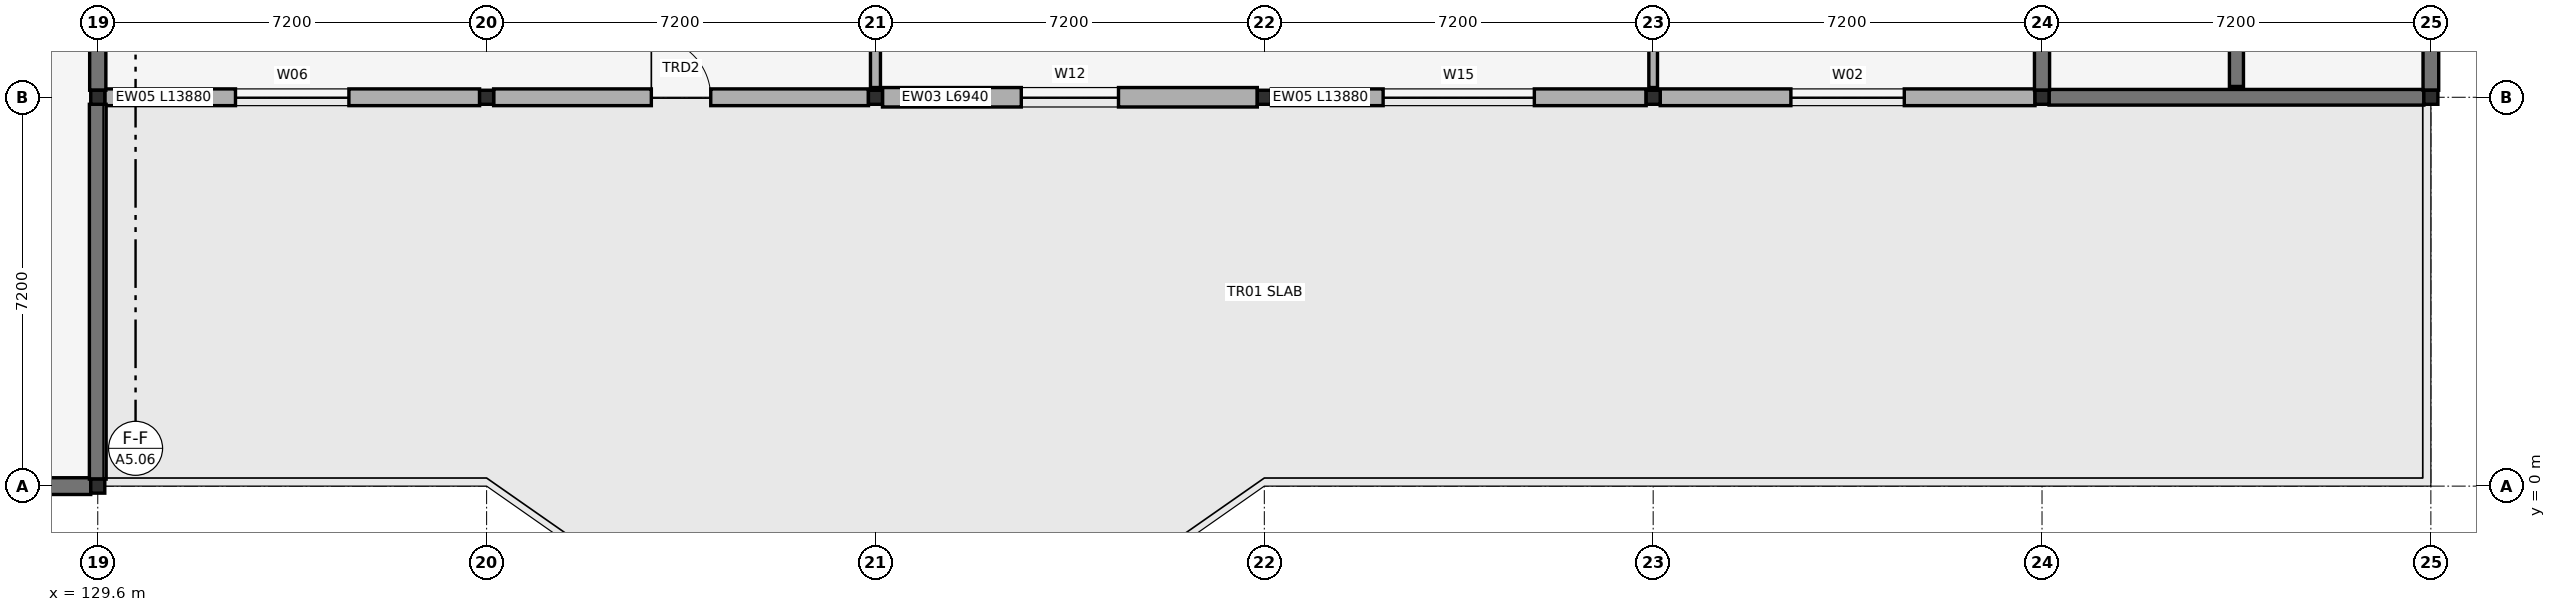
"""IFC4 building model, lengths in metres.
Left out: names, types, materials, properties, quantities, classifications, styles, units other than length and angle.
Written with IfcOpenShell. Run it as: python <this file> out.ifc"""

import sys

from ifc_helpers import new_model, si_unit, direction, frame, frame_2d, origin, origin_2d, place, context, subcontext, project, spatial, rectangle, hollow_rectangle, extrude, element, fill, save


model = new_model("IFC4")
c1 = context("Model", 3, precision=1e-05, world=origin(), true_north=direction((0.0, 1.0)))
c2 = subcontext(c1, "Body", "Model", "MODEL_VIEW")
j1 = project(units=[si_unit("LENGTHUNIT", "METRE"), si_unit("PLANEANGLEUNIT", "RADIAN")], contexts=[c1])
p1 = place(None, origin())
s1 = spatial("IfcSite", under=j1, at=p1, CompositionType="ELEMENT")
p2 = place(p1, origin())
s2 = spatial("IfcBuilding", under=s1, at=p2, CompositionType="ELEMENT")
p3 = place(p2, frame((0.0, 0.0, 23.4)))
s3 = spatial("IfcBuildingStorey", under=s2, at=p3, CompositionType="ELEMENT", Elevation=23.4)
for number, where, z_axis, x_axis in (
    (1, (129.6, 0.0, 0.0), (0.0, 0.0, 1.0), (1.0, 0.0, 0.0)),
    (2, (129.6, 7.2, 0.0), (0.0, 0.0, 1.0), (1.0, 0.0, 0.0)),
    (3, (136.8, 7.2, 0.0), (0.0, 0.0, 1.0), (1.0, 0.0, 0.0)),
    (4, (144.0, 7.2, 0.0), (0.0, 0.0, 1.0), (1.0, 0.0, 0.0)),
    (5, (151.2, 7.2, 0.0), (0.0, 0.0, 1.0), (1.0, 0.0, 0.0)),
    (6, (158.4, 7.2, 0.0), (0.0, 0.0, 1.0), (1.0, 0.0, 0.0)),
    (7, (165.6, 7.2, 0.0), (0.0, 0.0, 1.0), (1.0, 0.0, 0.0)),
    (8, (172.8, 7.2, 0.0), (0.0, 0.0, 1.0), (1.0, 0.0, 0.0)),
):
    element("IfcColumn", number, at=place(p3, frame(where, z_axis=z_axis, x_axis=x_axis)), inside=s3, PredefinedType="COLUMN", context=c2, shape_type="SweptSolid", body=[
        extrude(hollow_rectangle(XDim=0.26, YDim=0.26, WallThickness=0.012, at=origin_2d()), origin(), (0.0, 0.0, 1.0), 4.2),
    ])
p4 = place(p3, frame((129.73, 7.2, 0.0), z_axis=(0.0, 0.0, 1.0), x_axis=(1.0, 0.0, 0.0)))
e9 = element("IfcWall", 9, at=p4, inside=s3, PredefinedType="SOLIDWALL", context=c2, shape_type="SweptSolid", body=[
    extrude(rectangle(XDim=6.94, YDim=0.31, at=frame_2d((3.47, 0.0))), origin(), (0.0, 0.0, 1.0), 3.505),
])
p5 = place(p4, frame((2.42, 0.0, 0.95)))
e10 = element("IfcOpeningElement", 10, at=p5, cuts=e9, PredefinedType="OPENING", context=c2, shape_type="SweptSolid", body=[
    extrude(rectangle(XDim=2.1, YDim=2.0, at=frame_2d((1.05, 1.0))), frame((0.0, 0.17, 0.0), z_axis=(0.0, -1.0, 0.0), x_axis=(1.0, 0.0, 0.0)), (0.0, 0.0, 1.0), 0.34),
])
p6 = place(p3, frame((136.93, 7.2, 0.0), z_axis=(0.0, 0.0, 1.0), x_axis=(1.0, 0.0, 0.0)))
e11 = element("IfcWall", 11, at=p6, inside=s3, PredefinedType="SOLIDWALL", context=c2, shape_type="SweptSolid", body=[
    extrude(rectangle(XDim=6.94, YDim=0.31, at=frame_2d((3.47, 0.0))), origin(), (0.0, 0.0, 1.0), 3.98),
])
p7 = place(p6, frame((2.92, 0.0, 0.0)))
e12 = element("IfcOpeningElement", 12, at=p7, cuts=e11, PredefinedType="OPENING", context=c2, shape_type="SweptSolid", body=[
    extrude(rectangle(XDim=1.1, YDim=2.2, at=frame_2d((0.55, 1.1))), frame((0.0, 0.17, 0.0), z_axis=(0.0, -1.0, 0.0), x_axis=(1.0, 0.0, 0.0)), (0.0, 0.0, 1.0), 0.34),
])
p8 = place(p3, frame((144.13, 7.2, 0.0), z_axis=(0.0, 0.0, 1.0), x_axis=(1.0, 0.0, 0.0)))
e13 = element("IfcWall", 13, at=p8, inside=s3, PredefinedType="SOLIDWALL", context=c2, shape_type="SweptSolid", body=[
    extrude(rectangle(XDim=6.94, YDim=0.36, at=frame_2d((3.47, 0.0))), origin(), (0.0, 0.0, 1.0), 3.98),
])
p9 = place(p8, frame((2.57, 0.0, 0.95)))
e14 = element("IfcOpeningElement", 14, at=p9, cuts=e13, PredefinedType="OPENING", context=c2, shape_type="SweptSolid", body=[
    extrude(rectangle(XDim=1.8, YDim=1.75, at=frame_2d((0.9, 0.875))), frame((0.0, 0.195, 0.0), z_axis=(0.0, -1.0, 0.0), x_axis=(1.0, 0.0, 0.0)), (0.0, 0.0, 1.0), 0.39),
])
p10 = place(p3, frame((151.33, 7.2, 0.0), z_axis=(0.0, 0.0, 1.0), x_axis=(1.0, 0.0, 0.0)))
e15 = element("IfcWall", 15, at=p10, inside=s3, PredefinedType="SOLIDWALL", context=c2, shape_type="SweptSolid", body=[
    extrude(rectangle(XDim=6.94, YDim=0.31, at=frame_2d((3.47, 0.0))), origin(), (0.0, 0.0, 1.0), 3.98),
])
p11 = place(p10, frame((2.07, 0.0, 0.95)))
e16 = element("IfcOpeningElement", 16, at=p11, cuts=e15, PredefinedType="OPENING", context=c2, shape_type="SweptSolid", body=[
    extrude(rectangle(XDim=2.8, YDim=1.5, at=frame_2d((1.4, 0.75))), frame((0.0, 0.17, 0.0), z_axis=(0.0, -1.0, 0.0), x_axis=(1.0, 0.0, 0.0)), (0.0, 0.0, 1.0), 0.34),
])
p12 = place(p3, frame((158.53, 7.2, 0.0), z_axis=(0.0, 0.0, 1.0), x_axis=(1.0, 0.0, 0.0)))
e17 = element("IfcWall", 17, at=p12, inside=s3, PredefinedType="SOLIDWALL", context=c2, shape_type="SweptSolid", body=[
    extrude(rectangle(XDim=6.94, YDim=0.31, at=frame_2d((3.47, 0.0))), origin(), (0.0, 0.0, 1.0), 3.98),
])
p13 = place(p12, frame((2.42, 0.0, 0.95)))
e18 = element("IfcOpeningElement", 18, at=p13, cuts=e17, PredefinedType="OPENING", context=c2, shape_type="SweptSolid", body=[
    extrude(rectangle(XDim=2.1, YDim=2.65, at=frame_2d((1.05, 1.325))), frame((0.0, 0.17, 0.0), z_axis=(0.0, -1.0, 0.0), x_axis=(1.0, 0.0, 0.0)), (0.0, 0.0, 1.0), 0.34),
])
p14 = place(p3, frame((122.53, 0.0, 0.0), z_axis=(0.0, 0.0, 1.0), x_axis=(1.0, 0.0, 0.0)))
e19 = element("IfcWall", 19, at=p14, inside=s3, PredefinedType="SHEAR", context=c2, shape_type="SweptSolid", body=[
    extrude(rectangle(XDim=6.94, YDim=0.31, at=frame_2d((3.47, 0.0))), origin(), (0.0, 0.0, 1.0), 4.0),
])
p15 = place(p3, frame((129.6, 0.13, 0.0), z_axis=(0.0, 0.0, 1.0), x_axis=(0.0, 1.0, 0.0)))
e20 = element("IfcWall", 20, at=p15, inside=s3, PredefinedType="SHEAR", context=c2, shape_type="SweptSolid", body=[
    extrude(rectangle(XDim=6.94, YDim=0.31, at=frame_2d((3.47, 0.0))), origin(), (0.0, 0.0, 1.0), 4.0),
])
p16 = place(p3, frame((129.6, 7.33, 0.0), z_axis=(0.0, 0.0, 1.0), x_axis=(0.0, 1.0, 0.0)))
e21 = element("IfcWall", 21, at=p16, inside=s3, PredefinedType="SHEAR", context=c2, shape_type="SweptSolid", body=[
    extrude(rectangle(XDim=6.94, YDim=0.3, at=frame_2d((3.47, 0.0))), origin(), (0.0, 0.0, 1.0), 4.0),
])
p17 = place(p16, frame((2.67, 0.0, 0.0)))
e22 = element("IfcOpeningElement", 22, at=p17, cuts=e21, PredefinedType="OPENING", context=c2, shape_type="SweptSolid", body=[
    extrude(rectangle(XDim=1.6, YDim=2.2, at=frame_2d((0.8, 1.1))), frame((0.0, 0.165, 0.0), z_axis=(0.0, -1.0, 0.0), x_axis=(1.0, 0.0, 0.0)), (0.0, 0.0, 1.0), 0.33),
])
p18 = place(p3, frame((165.73, 7.2, 0.0), z_axis=(0.0, 0.0, 1.0), x_axis=(1.0, 0.0, 0.0)))
e23 = element("IfcWall", 23, at=p18, inside=s3, PredefinedType="SHEAR", context=c2, shape_type="SweptSolid", body=[
    extrude(rectangle(XDim=6.94, YDim=0.29, at=frame_2d((3.47, 0.0))), origin(), (0.0, 0.0, 1.0), 4.0),
])
p19 = place(p3, frame((165.6, 7.33, 0.0), z_axis=(0.0, 0.0, 1.0), x_axis=(0.0, 1.0, 0.0)))
e24 = element("IfcWall", 24, at=p19, inside=s3, PredefinedType="SHEAR", context=c2, shape_type="SweptSolid", body=[
    extrude(rectangle(XDim=6.94, YDim=0.28, at=frame_2d((3.47, 0.0))), origin(), (0.0, 0.0, 1.0), 4.0),
])
p20 = place(p3, frame((172.8, 7.33, 0.0), z_axis=(0.0, 0.0, 1.0), x_axis=(0.0, 1.0, 0.0)))
e25 = element("IfcWall", 25, at=p20, inside=s3, PredefinedType="SHEAR", context=c2, shape_type="SweptSolid", body=[
    extrude(rectangle(XDim=6.94, YDim=0.29, at=frame_2d((3.47, 0.0))), origin(), (0.0, 0.0, 1.0), 4.0),
])
p21 = place(p3, frame((169.2, 7.4, 0.0), z_axis=(0.0, 0.0, 1.0), x_axis=(0.0, 1.0, 0.0)))
e26 = element("IfcWall", 26, at=p21, inside=s3, PredefinedType="SHEAR", context=c2, shape_type="SweptSolid", body=[
    extrude(rectangle(XDim=14.0, YDim=0.26, at=frame_2d((7.0, 0.0))), origin(), (0.0, 0.0, 1.0), 4.0),
])
p22 = place(p21, frame((1.65, 0.0, 0.0)))
e27 = element("IfcOpeningElement", 27, at=p22, cuts=e26, PredefinedType="OPENING", context=c2, shape_type="SweptSolid", body=[
    extrude(rectangle(XDim=1.1, YDim=2.15, at=frame_2d((0.55, 1.075))), frame((0.0, 0.145, 0.0), z_axis=(0.0, -1.0, 0.0), x_axis=(1.0, 0.0, 0.0)), (0.0, 0.0, 1.0), 0.29),
])
p23 = place(p21, frame((10.6, 0.0, 0.0)))
e28 = element("IfcOpeningElement", 28, at=p23, cuts=e26, PredefinedType="OPENING", context=c2, shape_type="SweptSolid", body=[
    extrude(rectangle(XDim=1.2, YDim=2.25, at=frame_2d((0.6, 1.125))), frame((0.0, 0.145, 0.0), z_axis=(0.0, -1.0, 0.0), x_axis=(1.0, 0.0, 0.0)), (0.0, 0.0, 1.0), 0.29),
])
p24 = place(p3, frame((144.0, 7.38, 0.0), z_axis=(0.0, 0.0, 1.0), x_axis=(0.0, 1.0, 0.0)))
e29 = element("IfcWall", 29, at=p24, inside=s3, PredefinedType="PARTITIONING", context=c2, shape_type="SweptSolid", body=[
    extrude(rectangle(XDim=6.84, YDim=0.185, at=frame_2d((3.42, 0.0))), origin(), (0.0, 0.0, 1.0), 3.98),
])
p25 = place(p3, frame((158.4, 7.38, 0.0), z_axis=(0.0, 0.0, 1.0), x_axis=(0.0, 1.0, 0.0)))
e30 = element("IfcWall", 30, at=p25, inside=s3, PredefinedType="PARTITIONING", context=c2, shape_type="SweptSolid", body=[
    extrude(rectangle(XDim=6.84, YDim=0.16, at=frame_2d((3.42, 0.0))), origin(), (0.0, 0.0, 1.0), 3.98),
])
p26 = place(p5, origin())
e31 = element("IfcWindow", 31, at=p26, inside=s3, PartitioningType="SINGLE_PANEL", PredefinedType="WINDOW", context=c2, shape_type="SweptSolid", body=[
    extrude(rectangle(XDim=2.1, YDim=2.0, at=frame_2d((1.05, 1.0))), frame((0.0, 0.03, 0.0), z_axis=(0.0, -1.0, 0.0), x_axis=(1.0, 0.0, 0.0)), (0.0, 0.0, 1.0), 0.06),
])
fill(e10, e31)
p27 = place(p7, frame((1.1, 0.0, 0.0), z_axis=(0.0, 0.0, 1.0), x_axis=(-1.0, 0.0, 0.0)))
e32 = element("IfcDoor", 32, at=p27, inside=s3, OperationType="SINGLE_SWING_RIGHT", PredefinedType="DOOR", context=c2, shape_type="SweptSolid", body=[
    extrude(rectangle(XDim=1.1, YDim=2.2, at=frame_2d((0.55, 1.1))), frame((0.0, 0.025, 0.0), z_axis=(0.0, -1.0, 0.0), x_axis=(1.0, 0.0, 0.0)), (0.0, 0.0, 1.0), 0.05),
])
fill(e12, e32)
p28 = place(p9, origin())
e33 = element("IfcWindow", 33, at=p28, inside=s3, PartitioningType="SINGLE_PANEL", PredefinedType="WINDOW", context=c2, shape_type="SweptSolid", body=[
    extrude(rectangle(XDim=1.8, YDim=1.75, at=frame_2d((0.9, 0.875))), frame((0.0, 0.03, 0.0), z_axis=(0.0, -1.0, 0.0), x_axis=(1.0, 0.0, 0.0)), (0.0, 0.0, 1.0), 0.06),
])
fill(e14, e33)
p29 = place(p11, origin())
e34 = element("IfcWindow", 34, at=p29, inside=s3, PartitioningType="SINGLE_PANEL", PredefinedType="WINDOW", context=c2, shape_type="SweptSolid", body=[
    extrude(rectangle(XDim=2.8, YDim=1.5, at=frame_2d((1.4, 0.75))), frame((0.0, 0.03, 0.0), z_axis=(0.0, -1.0, 0.0), x_axis=(1.0, 0.0, 0.0)), (0.0, 0.0, 1.0), 0.06),
])
fill(e16, e34)
p30 = place(p13, origin())
e35 = element("IfcWindow", 35, at=p30, inside=s3, PartitioningType="SINGLE_PANEL", PredefinedType="WINDOW", context=c2, shape_type="SweptSolid", body=[
    extrude(rectangle(XDim=2.1, YDim=2.65, at=frame_2d((1.05, 1.325))), frame((0.0, 0.03, 0.0), z_axis=(0.0, -1.0, 0.0), x_axis=(1.0, 0.0, 0.0)), (0.0, 0.0, 1.0), 0.06),
])
fill(e18, e35)
save(model, sys.argv[1])
